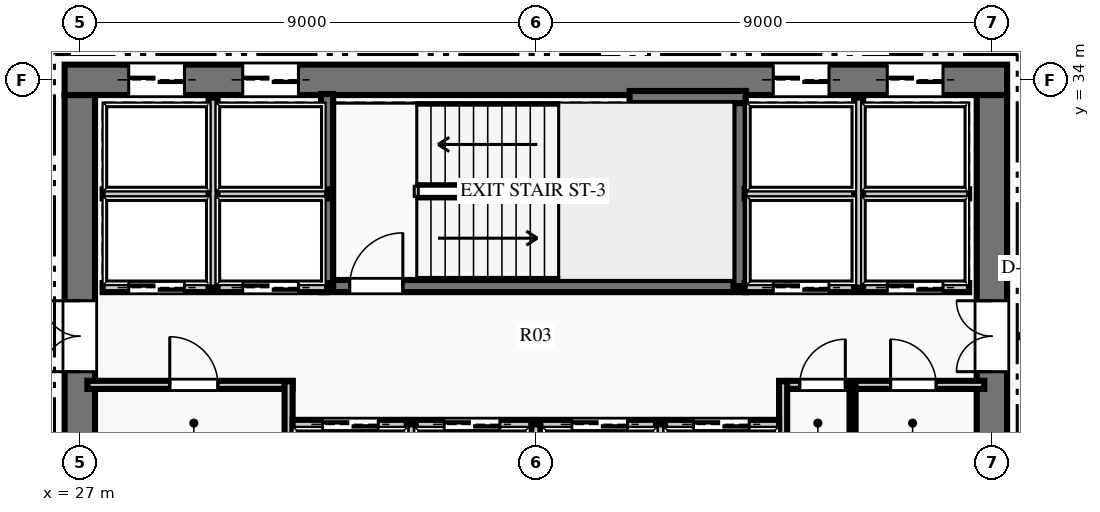
"""IFC4 building model, lengths in metres.
Left out: names, types, materials, properties, quantities, classifications, styles, units other than length and angle.
Written with IfcOpenShell. Run it as: python <this file> out.ifc"""

import sys

from ifc_helpers import new_model, si_unit, direction, frame, frame_2d, origin, place, context, subcontext, project, spatial, rectangle, extrude, element, fill, save


model = new_model("IFC4")
c1 = context("Model", 3, precision=1e-05, world=origin(), true_north=direction((0.0, 1.0)))
c2 = subcontext(c1, "Body", "Model", "MODEL_VIEW")
j1 = project(units=[si_unit("LENGTHUNIT", "METRE"), si_unit("PLANEANGLEUNIT", "RADIAN")], contexts=[c1])
p1 = place(None, origin())
s1 = spatial("IfcSite", under=j1, at=p1, CompositionType="ELEMENT")
p2 = place(p1, origin())
s2 = spatial("IfcBuilding", under=s1, at=p2, CompositionType="ELEMENT")
p3 = place(p2, frame((0.0, 0.0, 55.2)))
s3 = spatial("IfcBuildingStorey", under=s2, at=p3, CompositionType="ELEMENT", Elevation=55.2)
p4 = place(p3, frame((26.7, 34.0, 0.0), z_axis=(0.0, 0.0, 1.0), x_axis=(1.0, 0.0, 0.0)))
e1 = element("IfcWall", 1, at=p4, inside=s3, PredefinedType="SHEAR", context=c2, shape_type="SweptSolid", body=[
    extrude(rectangle(XDim=18.6, YDim=0.6, at=frame_2d((9.3, 0.0))), origin(), (0.0, 0.0, 1.0), 3.75),
])
p5 = place(p4, frame((1.265, 0.0, 0.0)))
e2 = element("IfcOpeningElement", 2, at=p5, cuts=e1, PredefinedType="OPENING", context=c2, shape_type="SweptSolid", body=[
    extrude(rectangle(XDim=1.1, YDim=2.15, at=frame_2d((0.55, 1.075))), frame((0.0, 0.31, 0.0), z_axis=(0.0, -1.0, 0.0), x_axis=(1.0, 0.0, 0.0)), (0.0, 0.0, 1.0), 0.62),
])
p6 = place(p4, frame((3.515, 0.0, 0.0)))
e3 = element("IfcOpeningElement", 3, at=p6, cuts=e1, PredefinedType="OPENING", context=c2, shape_type="SweptSolid", body=[
    extrude(rectangle(XDim=1.1, YDim=2.15, at=frame_2d((0.55, 1.075))), frame((0.0, 0.31, 0.0), z_axis=(0.0, -1.0, 0.0), x_axis=(1.0, 0.0, 0.0)), (0.0, 0.0, 1.0), 0.62),
])
p7 = place(p4, frame((13.985, 0.0, 0.0)))
e4 = element("IfcOpeningElement", 4, at=p7, cuts=e1, PredefinedType="OPENING", context=c2, shape_type="SweptSolid", body=[
    extrude(rectangle(XDim=1.1, YDim=2.15, at=frame_2d((0.55, 1.075))), frame((0.0, 0.31, 0.0), z_axis=(0.0, -1.0, 0.0), x_axis=(1.0, 0.0, 0.0)), (0.0, 0.0, 1.0), 0.62),
])
p8 = place(p4, frame((16.235, 0.0, 0.0)))
e5 = element("IfcOpeningElement", 5, at=p8, cuts=e1, PredefinedType="OPENING", context=c2, shape_type="SweptSolid", body=[
    extrude(rectangle(XDim=1.1, YDim=2.15, at=frame_2d((0.55, 1.075))), frame((0.0, 0.31, 0.0), z_axis=(0.0, -1.0, 0.0), x_axis=(1.0, 0.0, 0.0)), (0.0, 0.0, 1.0), 0.62),
])
p9 = place(p3, frame((27.0, 18.3, 0.0), z_axis=(0.0, 0.0, 1.0), x_axis=(0.0, 1.0, 0.0)))
e6 = element("IfcWall", 6, at=p9, inside=s3, PredefinedType="SHEAR", context=c2, shape_type="SweptSolid", body=[
    extrude(rectangle(XDim=15.4, YDim=0.6, at=frame_2d((7.7, 0.0))), origin(), (0.0, 0.0, 1.0), 3.75),
])
p10 = place(p9, frame((9.94, 0.0, 0.0)))
e7 = element("IfcOpeningElement", 7, at=p10, cuts=e6, PredefinedType="OPENING", context=c2, shape_type="SweptSolid", body=[
    extrude(rectangle(XDim=1.4, YDim=2.2, at=frame_2d((0.7, 1.1))), frame((0.0, 0.31, 0.0), z_axis=(0.0, -1.0, 0.0), x_axis=(1.0, 0.0, 0.0)), (0.0, 0.0, 1.0), 0.62),
])
p11 = place(p3, frame((45.0, 18.3, 0.0), z_axis=(0.0, 0.0, 1.0), x_axis=(0.0, 1.0, 0.0)))
e8 = element("IfcWall", 8, at=p11, inside=s3, PredefinedType="SHEAR", context=c2, shape_type="SweptSolid", body=[
    extrude(rectangle(XDim=15.4, YDim=0.6, at=frame_2d((7.7, 0.0))), origin(), (0.0, 0.0, 1.0), 3.75),
])
p12 = place(p11, frame((9.94, 0.0, 0.0)))
e9 = element("IfcOpeningElement", 9, at=p12, cuts=e8, PredefinedType="OPENING", context=c2, shape_type="SweptSolid", body=[
    extrude(rectangle(XDim=1.4, YDim=2.2, at=frame_2d((0.7, 1.1))), frame((0.0, 0.31, 0.0), z_axis=(0.0, -1.0, 0.0), x_axis=(1.0, 0.0, 0.0)), (0.0, 0.0, 1.0), 0.62),
])
p13 = place(p3, frame((31.76, 29.93, 0.0), z_axis=(0.0, 0.0, 1.0), x_axis=(1.0, 0.0, 0.0)))
e10 = element("IfcWall", 10, at=p13, inside=s3, PredefinedType="SHEAR", context=c2, shape_type="SweptSolid", body=[
    extrude(rectangle(XDim=8.38, YDim=0.24, at=frame_2d((4.19, 0.0))), origin(), (0.0, 0.0, 1.0), 3.75),
])
p14 = place(p13, frame((0.565, 0.0, 0.0)))
e11 = element("IfcOpeningElement", 11, at=p14, cuts=e10, PredefinedType="OPENING", context=c2, shape_type="SweptSolid", body=[
    extrude(rectangle(XDim=1.05, YDim=2.15, at=frame_2d((0.525, 1.075))), frame((0.0, 0.13, 0.0), z_axis=(0.0, -1.0, 0.0), x_axis=(1.0, 0.0, 0.0)), (0.0, 0.0, 1.0), 0.26),
])
p15 = place(p3, frame((31.88, 29.93, 0.0), z_axis=(0.0, 0.0, 1.0), x_axis=(0.0, 1.0, 0.0)))
e12 = element("IfcWall", 12, at=p15, inside=s3, PredefinedType="SHEAR", context=c2, shape_type="SweptSolid", body=[
    extrude(rectangle(XDim=3.79, YDim=0.24, at=frame_2d((1.895, 0.0))), origin(), (0.0, 0.0, 1.0), 3.75),
])
p16 = place(p3, frame((40.02, 29.93, 0.0), z_axis=(0.0, 0.0, 1.0), x_axis=(0.0, 1.0, 0.0)))
e13 = element("IfcWall", 13, at=p16, inside=s3, PredefinedType="SHEAR", context=c2, shape_type="SweptSolid", body=[
    extrude(rectangle(XDim=3.85, YDim=0.24, at=frame_2d((1.925, 0.0))), origin(), (0.0, 0.0, 1.0), 3.75),
])
p17 = place(p3, frame((37.85, 33.66, 0.0), z_axis=(0.0, 0.0, 1.0), x_axis=(1.0, 0.0, 0.0)))
e14 = element("IfcWall", 14, at=p17, inside=s3, PredefinedType="SHEAR", context=c2, shape_type="SweptSolid", body=[
    extrude(rectangle(XDim=2.29, YDim=0.24, at=frame_2d((1.145, 0.0))), origin(), (0.0, 0.0, 1.0), 3.75),
])
p18 = place(p3, frame((27.15, 27.98, 0.0), z_axis=(0.0, 0.0, 1.0), x_axis=(1.0, 0.0, 0.0)))
e15 = element("IfcWall", 15, at=p18, inside=s3, PredefinedType="PARTITIONING", context=c2, shape_type="SweptSolid", body=[
    extrude(rectangle(XDim=4.05, YDim=0.16, at=frame_2d((2.025, 0.0))), origin(), (0.0, 0.0, 1.0), 3.44),
])
p19 = place(p18, frame((1.625, 0.0, 0.0)))
e16 = element("IfcOpeningElement", 16, at=p19, cuts=e15, PredefinedType="OPENING", context=c2, shape_type="SweptSolid", body=[
    extrude(rectangle(XDim=0.95, YDim=2.15, at=frame_2d((0.475, 1.075))), frame((0.0, 0.09, 0.0), z_axis=(0.0, -1.0, 0.0), x_axis=(1.0, 0.0, 0.0)), (0.0, 0.0, 1.0), 0.18),
])
p20 = place(p3, frame((31.12, 26.54, 0.0), z_axis=(0.0, 0.0, 1.0), x_axis=(0.0, 1.0, 0.0)))
e17 = element("IfcWall", 17, at=p20, inside=s3, PredefinedType="PARTITIONING", context=c2, shape_type="SweptSolid", body=[
    extrude(rectangle(XDim=1.51, YDim=0.16, at=frame_2d((0.755, 0.0))), origin(), (0.0, 0.0, 1.0), 3.44),
])
p21 = place(p3, frame((40.8, 27.98, 0.0), z_axis=(0.0, 0.0, 1.0), x_axis=(1.0, 0.0, 0.0)))
e18 = element("IfcWall", 18, at=p21, inside=s3, PredefinedType="PARTITIONING", context=c2, shape_type="SweptSolid", body=[
    extrude(rectangle(XDim=4.05, YDim=0.16, at=frame_2d((2.025, 0.0))), origin(), (0.0, 0.0, 1.0), 3.44),
])
p22 = place(p21, frame((0.407, 0.0, 0.0)))
e19 = element("IfcOpeningElement", 19, at=p22, cuts=e18, PredefinedType="OPENING", context=c2, shape_type="SweptSolid", body=[
    extrude(rectangle(XDim=0.9, YDim=2.15, at=frame_2d((0.45, 1.075))), frame((0.0, 0.09, 0.0), z_axis=(0.0, -1.0, 0.0), x_axis=(1.0, 0.0, 0.0)), (0.0, 0.0, 1.0), 0.18),
])
p23 = place(p21, frame((2.2, 0.0, 0.0)))
e20 = element("IfcOpeningElement", 20, at=p23, cuts=e18, PredefinedType="OPENING", context=c2, shape_type="SweptSolid", body=[
    extrude(rectangle(XDim=0.9, YDim=2.15, at=frame_2d((0.45, 1.075))), frame((0.0, 0.09, 0.0), z_axis=(0.0, -1.0, 0.0), x_axis=(1.0, 0.0, 0.0)), (0.0, 0.0, 1.0), 0.18),
])
p24 = place(p3, frame((40.88, 26.54, 0.0), z_axis=(0.0, 0.0, 1.0), x_axis=(0.0, 1.0, 0.0)))
e21 = element("IfcWall", 21, at=p24, inside=s3, PredefinedType="PARTITIONING", context=c2, shape_type="SweptSolid", body=[
    extrude(rectangle(XDim=1.51, YDim=0.16, at=frame_2d((0.755, 0.0))), origin(), (0.0, 0.0, 1.0), 3.44),
])
p25 = place(p3, frame((42.25, 26.54, 0.0), z_axis=(0.0, 0.0, 1.0), x_axis=(0.0, 1.0, 0.0)))
e22 = element("IfcWall", 22, at=p25, inside=s3, PredefinedType="PARTITIONING", context=c2, shape_type="SweptSolid", body=[
    extrude(rectangle(XDim=1.44, YDim=0.12, at=frame_2d((0.72, 0.0))), origin(), (0.0, 0.0, 1.0), 3.44),
])
p26 = place(p3, frame((27.45, 29.9, 0.0), z_axis=(0.0, 0.0, 1.0), x_axis=(1.0, 0.0, 0.0)))
e23 = element("IfcWall", 23, at=p26, inside=s3, PredefinedType="PARTITIONING", context=c2, shape_type="SweptSolid", body=[
    extrude(rectangle(XDim=4.43, YDim=0.18, at=frame_2d((2.215, 0.0))), origin(), (0.0, 0.0, 1.0), 3.44),
])
p27 = place(p26, frame((0.515, 0.0, 0.0)))
e24 = element("IfcOpeningElement", 24, at=p27, cuts=e23, PredefinedType="OPENING", context=c2, shape_type="SweptSolid", body=[
    extrude(rectangle(XDim=1.1, YDim=2.15, at=frame_2d((0.55, 1.075))), frame((0.0, 0.1, 0.0), z_axis=(0.0, -1.0, 0.0), x_axis=(1.0, 0.0, 0.0)), (0.0, 0.0, 1.0), 0.2),
])
p28 = place(p26, frame((2.765, 0.0, 0.0)))
e25 = element("IfcOpeningElement", 25, at=p28, cuts=e23, PredefinedType="OPENING", context=c2, shape_type="SweptSolid", body=[
    extrude(rectangle(XDim=1.1, YDim=2.15, at=frame_2d((0.55, 1.075))), frame((0.0, 0.1, 0.0), z_axis=(0.0, -1.0, 0.0), x_axis=(1.0, 0.0, 0.0)), (0.0, 0.0, 1.0), 0.2),
])
p29 = place(p3, frame((27.45, 31.75, 0.0), z_axis=(0.0, 0.0, 1.0), x_axis=(1.0, 0.0, 0.0)))
e26 = element("IfcWall", 26, at=p29, inside=s3, PredefinedType="PARTITIONING", context=c2, shape_type="SweptSolid", body=[
    extrude(rectangle(XDim=4.43, YDim=0.18, at=frame_2d((2.215, 0.0))), origin(), (0.0, 0.0, 1.0), 3.44),
])
p30 = place(p3, frame((29.63, 29.9, 0.0), z_axis=(0.0, 0.0, 1.0), x_axis=(0.0, 1.0, 0.0)))
e27 = element("IfcWall", 27, at=p30, inside=s3, PredefinedType="PARTITIONING", context=c2, shape_type="SweptSolid", body=[
    extrude(rectangle(XDim=3.75, YDim=0.18, at=frame_2d((1.875, 0.0))), origin(), (0.0, 0.0, 1.0), 3.44),
])
p31 = place(p3, frame((40.12, 29.9, 0.0), z_axis=(0.0, 0.0, 1.0), x_axis=(1.0, 0.0, 0.0)))
e28 = element("IfcWall", 28, at=p31, inside=s3, PredefinedType="PARTITIONING", context=c2, shape_type="SweptSolid", body=[
    extrude(rectangle(XDim=4.43, YDim=0.18, at=frame_2d((2.215, 0.0))), origin(), (0.0, 0.0, 1.0), 3.44),
])
p32 = place(p31, frame((0.565, 0.0, 0.0)))
e29 = element("IfcOpeningElement", 29, at=p32, cuts=e28, PredefinedType="OPENING", context=c2, shape_type="SweptSolid", body=[
    extrude(rectangle(XDim=1.1, YDim=2.15, at=frame_2d((0.55, 1.075))), frame((0.0, 0.1, 0.0), z_axis=(0.0, -1.0, 0.0), x_axis=(1.0, 0.0, 0.0)), (0.0, 0.0, 1.0), 0.2),
])
p33 = place(p31, frame((2.815, 0.0, 0.0)))
e30 = element("IfcOpeningElement", 30, at=p33, cuts=e28, PredefinedType="OPENING", context=c2, shape_type="SweptSolid", body=[
    extrude(rectangle(XDim=1.1, YDim=2.15, at=frame_2d((0.55, 1.075))), frame((0.0, 0.1, 0.0), z_axis=(0.0, -1.0, 0.0), x_axis=(1.0, 0.0, 0.0)), (0.0, 0.0, 1.0), 0.2),
])
p34 = place(p3, frame((40.12, 31.75, 0.0), z_axis=(0.0, 0.0, 1.0), x_axis=(1.0, 0.0, 0.0)))
e31 = element("IfcWall", 31, at=p34, inside=s3, PredefinedType="PARTITIONING", context=c2, shape_type="SweptSolid", body=[
    extrude(rectangle(XDim=4.43, YDim=0.18, at=frame_2d((2.215, 0.0))), origin(), (0.0, 0.0, 1.0), 3.44),
])
p35 = place(p3, frame((42.37, 29.9, 0.0), z_axis=(0.0, 0.0, 1.0), x_axis=(0.0, 1.0, 0.0)))
e32 = element("IfcWall", 32, at=p35, inside=s3, PredefinedType="PARTITIONING", context=c2, shape_type="SweptSolid", body=[
    extrude(rectangle(XDim=3.75, YDim=0.18, at=frame_2d((1.875, 0.0))), origin(), (0.0, 0.0, 1.0), 3.44),
])
p36 = place(p3, frame((31.2, 27.2, 0.0), z_axis=(0.0, 0.0, 1.0), x_axis=(1.0, 0.0, 0.0)))
e33 = element("IfcWall", 33, at=p36, inside=s3, PredefinedType="PARTITIONING", context=c2, shape_type="SweptSolid", body=[
    extrude(rectangle(XDim=9.6, YDim=0.18, at=frame_2d((4.8, 0.0))), origin(), (0.0, 0.0, 1.0), 3.44),
])
p37 = place(p36, frame((0.59, 0.0, 0.0)))
e34 = element("IfcOpeningElement", 34, at=p37, cuts=e33, PredefinedType="OPENING", context=c2, shape_type="SweptSolid", body=[
    extrude(rectangle(XDim=1.1, YDim=2.15, at=frame_2d((0.55, 1.075))), frame((0.0, 0.1, 0.0), z_axis=(0.0, -1.0, 0.0), x_axis=(1.0, 0.0, 0.0)), (0.0, 0.0, 1.0), 0.2),
])
p38 = place(p36, frame((2.99, 0.0, 0.0)))
e35 = element("IfcOpeningElement", 35, at=p38, cuts=e33, PredefinedType="OPENING", context=c2, shape_type="SweptSolid", body=[
    extrude(rectangle(XDim=1.1, YDim=2.15, at=frame_2d((0.55, 1.075))), frame((0.0, 0.1, 0.0), z_axis=(0.0, -1.0, 0.0), x_axis=(1.0, 0.0, 0.0)), (0.0, 0.0, 1.0), 0.2),
])
p39 = place(p36, frame((5.51, 0.0, 0.0)))
e36 = element("IfcOpeningElement", 36, at=p39, cuts=e33, PredefinedType="OPENING", context=c2, shape_type="SweptSolid", body=[
    extrude(rectangle(XDim=1.1, YDim=2.15, at=frame_2d((0.55, 1.075))), frame((0.0, 0.1, 0.0), z_axis=(0.0, -1.0, 0.0), x_axis=(1.0, 0.0, 0.0)), (0.0, 0.0, 1.0), 0.2),
])
p40 = place(p36, frame((7.91, 0.0, 0.0)))
e37 = element("IfcOpeningElement", 37, at=p40, cuts=e33, PredefinedType="OPENING", context=c2, shape_type="SweptSolid", body=[
    extrude(rectangle(XDim=1.1, YDim=2.15, at=frame_2d((0.55, 1.075))), frame((0.0, 0.1, 0.0), z_axis=(0.0, -1.0, 0.0), x_axis=(1.0, 0.0, 0.0)), (0.0, 0.0, 1.0), 0.2),
])
for number, where, z_axis, x_axis in (
    (38, (33.54, 25.3, 0.0), (0.0, 0.0, 1.0), (0.0, 1.0, 0.0)),
    (39, (36.0, 25.3, 0.0), (0.0, 0.0, 1.0), (0.0, 1.0, 0.0)),
    (40, (38.46, 25.3, 0.0), (0.0, 0.0, 1.0), (0.0, 1.0, 0.0)),
):
    element("IfcWall", number, at=place(p3, frame(where, z_axis=z_axis, x_axis=x_axis)), inside=s3, PredefinedType="PARTITIONING", context=c2, shape_type="SweptSolid", body=[
        extrude(rectangle(XDim=1.9, YDim=0.18, at=frame_2d((0.95, 0.0))), origin(), (0.0, 0.0, 1.0), 3.44),
    ])
p41 = place(p19, origin())
e41 = element("IfcDoor", 41, at=p41, inside=s3, OperationType="SINGLE_SWING_LEFT", PredefinedType="DOOR", context=c2, shape_type="SweptSolid", body=[
    extrude(rectangle(XDim=0.95, YDim=2.15, at=frame_2d((0.475, 1.075))), frame((0.0, 0.025, 0.0), z_axis=(0.0, -1.0, 0.0), x_axis=(1.0, 0.0, 0.0)), (0.0, 0.0, 1.0), 0.05),
])
fill(e16, e41)
p42 = place(p22, origin())
e42 = element("IfcDoor", 42, at=p42, inside=s3, OperationType="SINGLE_SWING_RIGHT", PredefinedType="DOOR", context=c2, shape_type="SweptSolid", body=[
    extrude(rectangle(XDim=0.9, YDim=2.15, at=frame_2d((0.45, 1.075))), frame((0.0, 0.025, 0.0), z_axis=(0.0, -1.0, 0.0), x_axis=(1.0, 0.0, 0.0)), (0.0, 0.0, 1.0), 0.05),
])
fill(e19, e42)
p43 = place(p23, origin())
e43 = element("IfcDoor", 43, at=p43, inside=s3, OperationType="SINGLE_SWING_LEFT", PredefinedType="DOOR", context=c2, shape_type="SweptSolid", body=[
    extrude(rectangle(XDim=0.9, YDim=2.15, at=frame_2d((0.45, 1.075))), frame((0.0, 0.025, 0.0), z_axis=(0.0, -1.0, 0.0), x_axis=(1.0, 0.0, 0.0)), (0.0, 0.0, 1.0), 0.05),
])
fill(e20, e43)
p44 = place(p14, origin())
e44 = element("IfcDoor", 44, at=p44, inside=s3, OperationType="SINGLE_SWING_RIGHT", PredefinedType="DOOR", context=c2, shape_type="SweptSolid", body=[
    extrude(rectangle(XDim=1.05, YDim=2.15, at=frame_2d((0.525, 1.075))), frame((0.0, 0.025, 0.0), z_axis=(0.0, -1.0, 0.0), x_axis=(1.0, 0.0, 0.0)), (0.0, 0.0, 1.0), 0.05),
])
fill(e11, e44)
p45 = place(p10, origin())
e45 = element("IfcDoor", 45, at=p45, inside=s3, OperationType="DOUBLE_DOOR_SINGLE_SWING", PredefinedType="DOOR", context=c2, shape_type="SweptSolid", body=[
    extrude(rectangle(XDim=1.4, YDim=2.2, at=frame_2d((0.7, 1.1))), frame((0.0, 0.025, 0.0), z_axis=(0.0, -1.0, 0.0), x_axis=(1.0, 0.0, 0.0)), (0.0, 0.0, 1.0), 0.05),
])
fill(e7, e45)
p46 = place(p12, origin())
e46 = element("IfcDoor", 46, at=p46, inside=s3, OperationType="DOUBLE_DOOR_SINGLE_SWING", PredefinedType="DOOR", context=c2, shape_type="SweptSolid", body=[
    extrude(rectangle(XDim=1.4, YDim=2.2, at=frame_2d((0.7, 1.1))), frame((0.0, 0.025, 0.0), z_axis=(0.0, -1.0, 0.0), x_axis=(1.0, 0.0, 0.0)), (0.0, 0.0, 1.0), 0.05),
])
fill(e9, e46)
p47 = place(p27, origin())
e47 = element("IfcDoor", 47, at=p47, inside=s3, OperationType="SLIDING_TO_LEFT", PredefinedType="DOOR", context=c2, shape_type="SweptSolid", body=[
    extrude(rectangle(XDim=1.1, YDim=2.15, at=frame_2d((0.55, 1.075))), frame((0.0, 0.025, 0.0), z_axis=(0.0, -1.0, 0.0), x_axis=(1.0, 0.0, 0.0)), (0.0, 0.0, 1.0), 0.05),
])
fill(e24, e47)
p48 = place(p28, origin())
e48 = element("IfcDoor", 48, at=p48, inside=s3, OperationType="SLIDING_TO_LEFT", PredefinedType="DOOR", context=c2, shape_type="SweptSolid", body=[
    extrude(rectangle(XDim=1.1, YDim=2.15, at=frame_2d((0.55, 1.075))), frame((0.0, 0.025, 0.0), z_axis=(0.0, -1.0, 0.0), x_axis=(1.0, 0.0, 0.0)), (0.0, 0.0, 1.0), 0.05),
])
fill(e25, e48)
p49 = place(p5, origin())
e49 = element("IfcDoor", 49, at=p49, inside=s3, OperationType="SLIDING_TO_LEFT", PredefinedType="DOOR", context=c2, shape_type="SweptSolid", body=[
    extrude(rectangle(XDim=1.1, YDim=2.15, at=frame_2d((0.55, 1.075))), frame((0.0, 0.025, 0.0), z_axis=(0.0, -1.0, 0.0), x_axis=(1.0, 0.0, 0.0)), (0.0, 0.0, 1.0), 0.05),
])
fill(e2, e49)
p50 = place(p6, origin())
e50 = element("IfcDoor", 50, at=p50, inside=s3, OperationType="SLIDING_TO_LEFT", PredefinedType="DOOR", context=c2, shape_type="SweptSolid", body=[
    extrude(rectangle(XDim=1.1, YDim=2.15, at=frame_2d((0.55, 1.075))), frame((0.0, 0.025, 0.0), z_axis=(0.0, -1.0, 0.0), x_axis=(1.0, 0.0, 0.0)), (0.0, 0.0, 1.0), 0.05),
])
fill(e3, e50)
p51 = place(p32, origin())
e51 = element("IfcDoor", 51, at=p51, inside=s3, OperationType="SLIDING_TO_LEFT", PredefinedType="DOOR", context=c2, shape_type="SweptSolid", body=[
    extrude(rectangle(XDim=1.1, YDim=2.15, at=frame_2d((0.55, 1.075))), frame((0.0, 0.025, 0.0), z_axis=(0.0, -1.0, 0.0), x_axis=(1.0, 0.0, 0.0)), (0.0, 0.0, 1.0), 0.05),
])
fill(e29, e51)
p52 = place(p33, origin())
e52 = element("IfcDoor", 52, at=p52, inside=s3, OperationType="SLIDING_TO_LEFT", PredefinedType="DOOR", context=c2, shape_type="SweptSolid", body=[
    extrude(rectangle(XDim=1.1, YDim=2.15, at=frame_2d((0.55, 1.075))), frame((0.0, 0.025, 0.0), z_axis=(0.0, -1.0, 0.0), x_axis=(1.0, 0.0, 0.0)), (0.0, 0.0, 1.0), 0.05),
])
fill(e30, e52)
p53 = place(p7, origin())
e53 = element("IfcDoor", 53, at=p53, inside=s3, OperationType="SLIDING_TO_LEFT", PredefinedType="DOOR", context=c2, shape_type="SweptSolid", body=[
    extrude(rectangle(XDim=1.1, YDim=2.15, at=frame_2d((0.55, 1.075))), frame((0.0, 0.025, 0.0), z_axis=(0.0, -1.0, 0.0), x_axis=(1.0, 0.0, 0.0)), (0.0, 0.0, 1.0), 0.05),
])
fill(e4, e53)
p54 = place(p8, origin())
e54 = element("IfcDoor", 54, at=p54, inside=s3, OperationType="SLIDING_TO_LEFT", PredefinedType="DOOR", context=c2, shape_type="SweptSolid", body=[
    extrude(rectangle(XDim=1.1, YDim=2.15, at=frame_2d((0.55, 1.075))), frame((0.0, 0.025, 0.0), z_axis=(0.0, -1.0, 0.0), x_axis=(1.0, 0.0, 0.0)), (0.0, 0.0, 1.0), 0.05),
])
fill(e5, e54)
p55 = place(p37, origin())
e55 = element("IfcDoor", 55, at=p55, inside=s3, OperationType="SLIDING_TO_LEFT", PredefinedType="DOOR", context=c2, shape_type="SweptSolid", body=[
    extrude(rectangle(XDim=1.1, YDim=2.15, at=frame_2d((0.55, 1.075))), frame((0.0, 0.025, 0.0), z_axis=(0.0, -1.0, 0.0), x_axis=(1.0, 0.0, 0.0)), (0.0, 0.0, 1.0), 0.05),
])
fill(e34, e55)
p56 = place(p38, origin())
e56 = element("IfcDoor", 56, at=p56, inside=s3, OperationType="SLIDING_TO_LEFT", PredefinedType="DOOR", context=c2, shape_type="SweptSolid", body=[
    extrude(rectangle(XDim=1.1, YDim=2.15, at=frame_2d((0.55, 1.075))), frame((0.0, 0.025, 0.0), z_axis=(0.0, -1.0, 0.0), x_axis=(1.0, 0.0, 0.0)), (0.0, 0.0, 1.0), 0.05),
])
fill(e35, e56)
p57 = place(p39, origin())
e57 = element("IfcDoor", 57, at=p57, inside=s3, OperationType="SLIDING_TO_LEFT", PredefinedType="DOOR", context=c2, shape_type="SweptSolid", body=[
    extrude(rectangle(XDim=1.1, YDim=2.15, at=frame_2d((0.55, 1.075))), frame((0.0, 0.025, 0.0), z_axis=(0.0, -1.0, 0.0), x_axis=(1.0, 0.0, 0.0)), (0.0, 0.0, 1.0), 0.05),
])
fill(e36, e57)
p58 = place(p40, origin())
e58 = element("IfcDoor", 58, at=p58, inside=s3, OperationType="SLIDING_TO_LEFT", PredefinedType="DOOR", context=c2, shape_type="SweptSolid", body=[
    extrude(rectangle(XDim=1.1, YDim=2.15, at=frame_2d((0.55, 1.075))), frame((0.0, 0.025, 0.0), z_axis=(0.0, -1.0, 0.0), x_axis=(1.0, 0.0, 0.0)), (0.0, 0.0, 1.0), 0.05),
])
fill(e37, e58)
save(model, sys.argv[1])
